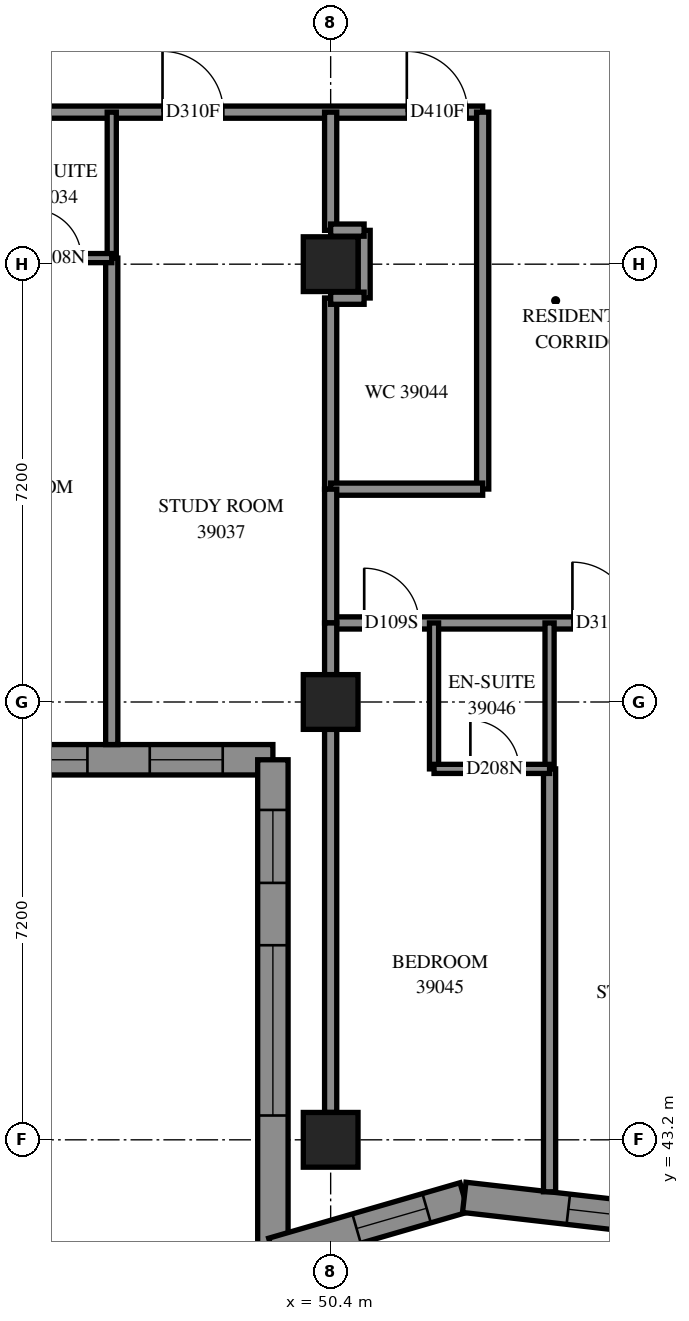
"""IFC4 building model, lengths in metres.
Left out: names, types, materials, properties, quantities, classifications, styles, units other than length and angle.
Written with IfcOpenShell. Run it as: python <this file> out.ifc"""

import sys

from ifc_helpers import new_model, si_unit, direction, frame, frame_2d, origin, origin_2d, place, context, subcontext, project, spatial, polyline, rectangle, outline, extrude, element, fill, save


model = new_model("IFC4")
c1 = context("Model", 3, precision=1e-05, world=origin(), true_north=direction((0.0, 1.0)))
c2 = subcontext(c1, "Body", "Model", "MODEL_VIEW")
j1 = project(units=[si_unit("LENGTHUNIT", "METRE"), si_unit("PLANEANGLEUNIT", "RADIAN")], contexts=[c1])
p1 = place(None, origin())
s1 = spatial("IfcSite", under=j1, at=p1, CompositionType="ELEMENT")
p2 = place(p1, origin())
s2 = spatial("IfcBuilding", under=s1, at=p2, CompositionType="ELEMENT")
p3 = place(p2, frame((0.0, 0.0, 145.6)))
s3 = spatial("IfcBuildingStorey", under=s2, at=p3, CompositionType="ELEMENT", Elevation=145.6)
for number, where, z_axis, x_axis in (
    (1, (50.4, 43.2, 0.0), (0.0, 0.0, 1.0), (1.0, 0.0, 0.0)),
    (2, (50.4, 50.4, 0.0), (0.0, 0.0, 1.0), (1.0, 0.0, 0.0)),
    (3, (50.4, 57.6, 0.0), (0.0, 0.0, 1.0), (1.0, 0.0, 0.0)),
):
    element("IfcColumn", number, at=place(p3, frame(where, z_axis=z_axis, x_axis=x_axis)), inside=s3, PredefinedType="COLUMN", context=c2, shape_type="SweptSolid", body=[
        extrude(rectangle(XDim=0.9, YDim=0.9, at=origin_2d()), origin(), (0.0, 0.0, 1.0), 3.1),
    ])
p4 = place(p3, frame((42.25, 49.45, 0.0), z_axis=(0.0, 0.0, 1.0), x_axis=(1.0, 0.0, 0.0)))
e4 = element("IfcWall", 4, at=p4, inside=s3, PredefinedType="SOLIDWALL", context=c2, shape_type="SweptSolid", body=[
    extrude(outline(polyline([(-0.25, -0.25), (6.95, -0.25), (7.45, 0.25), (0.25, 0.25), (-0.25, -0.25)])), origin(), (0.0, 0.0, 1.0), 3.1),
])
p5 = place(p4, frame((1.35, 0.0, 0.45)))
e5 = element("IfcOpeningElement", 5, at=p5, cuts=e4, PredefinedType="OPENING", context=c2, shape_type="SweptSolid", body=[
    extrude(rectangle(XDim=2.8, YDim=2.5, at=frame_2d((1.4, 1.25))), frame((0.0, 0.26, 0.0), z_axis=(0.0, -1.0, 0.0), x_axis=(1.0, 0.0, 0.0)), (0.0, 0.0, 1.0), 0.52),
])
p6 = place(p4, frame((5.175, 0.0, 0.45)))
e6 = element("IfcOpeningElement", 6, at=p6, cuts=e4, PredefinedType="OPENING", context=c2, shape_type="SweptSolid", body=[
    extrude(rectangle(XDim=1.2, YDim=2.5, at=frame_2d((0.6, 1.25))), frame((0.0, 0.26, 0.0), z_axis=(0.0, -1.0, 0.0), x_axis=(1.0, 0.0, 0.0)), (0.0, 0.0, 1.0), 0.52),
])
p7 = place(p3, frame((49.45, 49.45, 0.0), z_axis=(0.0, 0.0, 1.0), x_axis=(0.0, -1.0, 0.0)))
e7 = element("IfcWall", 7, at=p7, inside=s3, PredefinedType="SOLIDWALL", context=c2, shape_type="SweptSolid", body=[
    extrude(outline(polyline([(0.25, -0.25), (8.441, -0.25), (7.776, 0.25), (-0.25, 0.25), (0.25, -0.25)])), origin(), (0.0, 0.0, 1.0), 3.1),
])
p8 = place(p7, frame((3.05, 0.0, 0.45)))
e8 = element("IfcOpeningElement", 8, at=p8, cuts=e7, PredefinedType="OPENING", context=c2, shape_type="SweptSolid", body=[
    extrude(rectangle(XDim=2.8, YDim=2.5, at=frame_2d((1.4, 1.25))), frame((0.0, 0.26, 0.0), z_axis=(0.0, -1.0, 0.0), x_axis=(1.0, 0.0, 0.0)), (0.0, 0.0, 1.0), 0.52),
])
p9 = place(p7, frame((0.825, 0.0, 0.45)))
e9 = element("IfcOpeningElement", 9, at=p9, cuts=e7, PredefinedType="OPENING", context=c2, shape_type="SweptSolid", body=[
    extrude(rectangle(XDim=1.2, YDim=2.5, at=frame_2d((0.6, 1.25))), frame((0.0, 0.26, 0.0), z_axis=(0.0, -1.0, 0.0), x_axis=(1.0, 0.0, 0.0)), (0.0, 0.0, 1.0), 0.52),
])
p10 = place(p3, frame((49.45, 41.342, 0.0), z_axis=(0.0, 0.0, 1.0), x_axis=(0.9604489769, 0.2784560338, 0.0)))
e10 = element("IfcWall", 10, at=p10, inside=s3, PredefinedType="SOLIDWALL", context=c2, shape_type="SweptSolid", body=[
    extrude(outline(polyline([(-0.333, -0.25), (3.226, -0.25), (3.326, 0.25), (0.333, 0.25), (-0.333, -0.25)])), origin(), (0.0, 0.0, 1.0), 3.1),
])
p11 = place(p10, frame((1.433, 0.0, 0.45)))
e11 = element("IfcOpeningElement", 11, at=p11, cuts=e10, PredefinedType="OPENING", context=c2, shape_type="SweptSolid", body=[
    extrude(rectangle(XDim=1.2, YDim=2.5, at=frame_2d((0.6, 1.25))), frame((0.0, 0.26, 0.0), z_axis=(0.0, -1.0, 0.0), x_axis=(1.0, 0.0, 0.0)), (0.0, 0.0, 1.0), 0.52),
])
p12 = place(p3, frame((52.597, 42.254, 0.0), z_axis=(0.0, 0.0, 1.0), x_axis=(0.9935199118, -0.1136581927, 0.0)))
e12 = element("IfcWall", 12, at=p12, inside=s3, PredefinedType="SOLIDWALL", context=c2, shape_type="SweptSolid", body=[
    extrude(outline(polyline([(0.05, -0.25), (3.491, -0.25), (3.433, 0.25), (-0.05, 0.25), (0.05, -0.25)])), origin(), (0.0, 0.0, 1.0), 3.1),
])
p13 = place(p12, frame((1.723, 0.0, 0.45)))
e13 = element("IfcOpeningElement", 13, at=p13, cuts=e12, PredefinedType="OPENING", context=c2, shape_type="SweptSolid", body=[
    extrude(rectangle(XDim=1.2, YDim=2.5, at=frame_2d((0.6, 1.25))), frame((0.0, 0.26, 0.0), z_axis=(0.0, -1.0, 0.0), x_axis=(1.0, 0.0, 0.0)), (0.0, 0.0, 1.0), 0.52),
])
p14 = place(p3, frame((36.0, 60.1, 0.0), z_axis=(0.0, 0.0, 1.0), x_axis=(1.0, 0.0, 0.0)))
e14 = element("IfcWall", 14, at=p14, inside=s3, PredefinedType="PARTITIONING", context=c2, shape_type="SweptSolid", body=[
    extrude(rectangle(XDim=16.9, YDim=0.2, at=frame_2d((8.45, 0.0))), origin(), (0.0, 0.0, 1.0), 3.1),
])
p15 = place(p14, frame((4.125, 0.0, 0.0)))
e15 = element("IfcOpeningElement", 15, at=p15, cuts=e14, PredefinedType="OPENING", context=c2, shape_type="SweptSolid", body=[
    extrude(rectangle(XDim=1.0, YDim=2.1, at=frame_2d((0.5, 1.05))), frame((0.0, 0.11, 0.0), z_axis=(0.0, -1.0, 0.0), x_axis=(1.0, 0.0, 0.0)), (0.0, 0.0, 1.0), 0.22),
])
p16 = place(p14, frame((7.6, 0.0, 0.0)))
e16 = element("IfcOpeningElement", 16, at=p16, cuts=e14, PredefinedType="OPENING", context=c2, shape_type="SweptSolid", body=[
    extrude(rectangle(XDim=0.9, YDim=2.1, at=frame_2d((0.45, 1.05))), frame((0.0, 0.11, 0.0), z_axis=(0.0, -1.0, 0.0), x_axis=(1.0, 0.0, 0.0)), (0.0, 0.0, 1.0), 0.22),
])
p17 = place(p14, frame((11.635, 0.0, 0.0)))
e17 = element("IfcOpeningElement", 17, at=p17, cuts=e14, PredefinedType="OPENING", context=c2, shape_type="SweptSolid", body=[
    extrude(rectangle(XDim=1.0, YDim=2.1, at=frame_2d((0.5, 1.05))), frame((0.0, 0.11, 0.0), z_axis=(0.0, -1.0, 0.0), x_axis=(1.0, 0.0, 0.0)), (0.0, 0.0, 1.0), 0.22),
])
p18 = place(p14, frame((15.652, 0.0, 0.0)))
e18 = element("IfcOpeningElement", 18, at=p18, cuts=e14, PredefinedType="OPENING", context=c2, shape_type="SweptSolid", body=[
    extrude(rectangle(XDim=1.0, YDim=2.1, at=frame_2d((0.5, 1.05))), frame((0.0, 0.11, 0.0), z_axis=(0.0, -1.0, 0.0), x_axis=(1.0, 0.0, 0.0)), (0.0, 0.0, 1.0), 0.22),
])
p19 = place(p3, frame((46.8, 49.7, 0.0), z_axis=(0.0, 0.0, 1.0), x_axis=(0.0, 1.0, 0.0)))
e19 = element("IfcWall", 19, at=p19, inside=s3, PredefinedType="PARTITIONING", context=c2, shape_type="SweptSolid", body=[
    extrude(rectangle(XDim=8.0, YDim=0.2, at=frame_2d((4.0, 0.0))), origin(), (0.0, 0.0, 1.0), 3.1),
])
p20 = place(p3, frame((54.0, 42.345, 0.0), z_axis=(0.0, 0.0, 1.0), x_axis=(0.0, 1.0, 0.0)))
e20 = element("IfcWall", 20, at=p20, inside=s3, PredefinedType="PARTITIONING", context=c2, shape_type="SweptSolid", body=[
    extrude(rectangle(XDim=6.955, YDim=0.2, at=frame_2d((3.477, 0.0))), origin(), (0.0, 0.0, 1.0), 3.1),
])
p21 = place(p3, frame((50.4, 43.65, 0.0), z_axis=(0.0, 0.0, 1.0), x_axis=(0.0, 1.0, 0.0)))
e21 = element("IfcWall", 21, at=p21, inside=s3, PredefinedType="PARTITIONING", context=c2, shape_type="SweptSolid", body=[
    extrude(rectangle(XDim=6.3, YDim=0.2, at=frame_2d((3.15, 0.0))), origin(), (0.0, 0.0, 1.0), 2.6),
])
p22 = place(p3, frame((52.9, 53.902, 0.0), z_axis=(0.0, 0.0, 1.0), x_axis=(0.0, 1.0, 0.0)))
e22 = element("IfcWall", 22, at=p22, inside=s3, PredefinedType="PARTITIONING", context=c2, shape_type="SweptSolid", body=[
    extrude(rectangle(XDim=6.198, YDim=0.2, at=frame_2d((3.099, 0.0))), origin(), (0.0, 0.0, 1.0), 3.1),
])
p23 = place(p3, frame((50.4, 51.7, 0.0), z_axis=(0.0, 0.0, 1.0), x_axis=(1.0, 0.0, 0.0)))
e23 = element("IfcWall", 23, at=p23, inside=s3, PredefinedType="PARTITIONING", context=c2, shape_type="SweptSolid", body=[
    extrude(rectangle(XDim=5.1, YDim=0.2, at=frame_2d((2.55, 0.0))), origin(), (0.0, 0.0, 1.0), 3.1),
])
p24 = place(p23, frame((0.552, 0.0, 0.0)))
e24 = element("IfcOpeningElement", 24, at=p24, cuts=e23, PredefinedType="OPENING", context=c2, shape_type="SweptSolid", body=[
    extrude(rectangle(XDim=0.9, YDim=2.1, at=frame_2d((0.45, 1.05))), frame((0.0, 0.11, 0.0), z_axis=(0.0, -1.0, 0.0), x_axis=(1.0, 0.0, 0.0)), (0.0, 0.0, 1.0), 0.22),
])
p25 = place(p23, frame((3.976, 0.0, 0.0)))
e25 = element("IfcOpeningElement", 25, at=p25, cuts=e23, PredefinedType="OPENING", context=c2, shape_type="SweptSolid", body=[
    extrude(rectangle(XDim=1.0, YDim=2.1, at=frame_2d((0.5, 1.05))), frame((0.0, 0.11, 0.0), z_axis=(0.0, -1.0, 0.0), x_axis=(1.0, 0.0, 0.0)), (0.0, 0.0, 1.0), 0.22),
])
p26 = place(p3, frame((50.4, 53.9, 0.0), z_axis=(0.0, 0.0, 1.0), x_axis=(0.0, 1.0, 0.0)))
e26 = element("IfcWall", 26, at=p26, inside=s3, PredefinedType="PARTITIONING", context=c2, shape_type="SweptSolid", body=[
    extrude(rectangle(XDim=3.144, YDim=0.2, at=frame_2d((1.572, 0.0))), origin(), (0.0, 0.0, 1.0), 3.1),
])
p27 = place(p3, frame((50.4, 53.9, 0.0), z_axis=(0.0, 0.0, 1.0), x_axis=(1.0, 0.0, 0.0)))
e27 = element("IfcWall", 27, at=p27, inside=s3, PredefinedType="PARTITIONING", context=c2, shape_type="SweptSolid", body=[
    extrude(rectangle(XDim=2.5, YDim=0.2, at=frame_2d((1.25, 0.0))), origin(), (0.0, 0.0, 1.0), 3.1),
])
for number, where, z_axis, x_axis in (
    (28, (52.1, 49.3, 0.0), (0.0, 0.0, 1.0), (0.0, 1.0, 0.0)),
    (29, (54.0, 49.3, 0.0), (0.0, 0.0, 1.0), (0.0, 1.0, 0.0)),
    (30, (46.8, 57.7, 0.0), (0.0, 0.0, 1.0), (0.0, 1.0, 0.0)),
):
    element("IfcWall", number, at=place(p3, frame(where, z_axis=z_axis, x_axis=x_axis)), inside=s3, PredefinedType="PARTITIONING", context=c2, shape_type="SweptSolid", body=[
        extrude(rectangle(XDim=2.4, YDim=0.15, at=frame_2d((1.2, 0.0))), origin(), (0.0, 0.0, 1.0), 3.1),
    ])
p28 = place(p3, frame((50.4, 51.7, 0.0), z_axis=(0.0, 0.0, 1.0), x_axis=(0.0, 1.0, 0.0)))
e31 = element("IfcWall", 31, at=p28, inside=s3, PredefinedType="PARTITIONING", context=c2, shape_type="SweptSolid", body=[
    extrude(rectangle(XDim=2.2, YDim=0.2, at=frame_2d((1.1, 0.0))), origin(), (0.0, 0.0, 1.0), 3.1),
])
p29 = place(p3, frame((50.4, 58.156, 0.0), z_axis=(0.0, 0.0, 1.0), x_axis=(0.0, 1.0, 0.0)))
e32 = element("IfcWall", 32, at=p29, inside=s3, PredefinedType="PARTITIONING", context=c2, shape_type="SweptSolid", body=[
    extrude(rectangle(XDim=1.944, YDim=0.2, at=frame_2d((0.972, 0.0))), origin(), (0.0, 0.0, 1.0), 3.1),
])
p30 = place(p3, frame((44.9, 57.7, 0.0), z_axis=(0.0, 0.0, 1.0), x_axis=(1.0, 0.0, 0.0)))
e33 = element("IfcWall", 33, at=p30, inside=s3, PredefinedType="PARTITIONING", context=c2, shape_type="SweptSolid", body=[
    extrude(rectangle(XDim=1.9, YDim=0.15, at=frame_2d((0.95, 0.0))), origin(), (0.0, 0.0, 1.0), 3.1),
])
p31 = place(p30, frame((0.598, 0.0, 0.0)))
e34 = element("IfcOpeningElement", 34, at=p31, cuts=e33, PredefinedType="OPENING", context=c2, shape_type="SweptSolid", body=[
    extrude(rectangle(XDim=0.8, YDim=2.1, at=frame_2d((0.4, 1.05))), frame((0.0, 0.085, 0.0), z_axis=(0.0, -1.0, 0.0), x_axis=(1.0, 0.0, 0.0)), (0.0, 0.0, 1.0), 0.17),
])
p32 = place(p3, frame((52.1, 49.3, 0.0), z_axis=(0.0, 0.0, 1.0), x_axis=(1.0, 0.0, 0.0)))
e35 = element("IfcWall", 35, at=p32, inside=s3, PredefinedType="PARTITIONING", context=c2, shape_type="SweptSolid", body=[
    extrude(rectangle(XDim=1.9, YDim=0.15, at=frame_2d((0.95, 0.0))), origin(), (0.0, 0.0, 1.0), 3.1),
])
p33 = place(p32, frame((0.598, 0.0, 0.0)))
e36 = element("IfcOpeningElement", 36, at=p33, cuts=e35, PredefinedType="OPENING", context=c2, shape_type="SweptSolid", body=[
    extrude(rectangle(XDim=0.8, YDim=2.1, at=frame_2d((0.4, 1.05))), frame((0.0, 0.085, 0.0), z_axis=(0.0, -1.0, 0.0), x_axis=(1.0, 0.0, 0.0)), (0.0, 0.0, 1.0), 0.17),
])
p34 = place(p3, frame((50.95, 57.044, 0.0), z_axis=(0.0, 0.0, 1.0), x_axis=(0.0, 1.0, 0.0)))
e37 = element("IfcWall", 37, at=p34, inside=s3, PredefinedType="PARTITIONING", context=c2, shape_type="SweptSolid", body=[
    extrude(rectangle(XDim=1.112, YDim=0.2, at=frame_2d((0.556, 0.0))), origin(), (0.0, 0.0, 1.0), 3.1),
])
p35 = place(p3, frame((50.4, 50.85, 0.0), z_axis=(0.0, 0.0, 1.0), x_axis=(0.0, 1.0, 0.0)))
e38 = element("IfcWall", 38, at=p35, inside=s3, PredefinedType="PARTITIONING", context=c2, shape_type="SweptSolid", body=[
    extrude(rectangle(XDim=0.85, YDim=0.2, at=frame_2d((0.425, 0.0))), origin(), (0.0, 0.0, 1.0), 3.1),
])
for number, where, z_axis, x_axis in (
    (39, (50.4, 58.16, 0.0), (0.0, 0.0, 1.0), (1.0, 0.0, 0.0)),
    (40, (50.4, 57.04, 0.0), (0.0, 0.0, 1.0), (1.0, 0.0, 0.0)),
):
    element("IfcWall", number, at=place(p3, frame(where, z_axis=z_axis, x_axis=x_axis)), inside=s3, PredefinedType="PARTITIONING", context=c2, shape_type="SweptSolid", body=[
        extrude(rectangle(XDim=0.55, YDim=0.2, at=frame_2d((0.275, 0.0))), origin(), (0.0, 0.0, 1.0), 3.1),
    ])
p36 = place(p5, origin())
e41 = element("IfcWindow", 41, at=p36, inside=s3, PartitioningType="SINGLE_PANEL", PredefinedType="WINDOW", context=c2, shape_type="SweptSolid", body=[
    extrude(rectangle(XDim=2.8, YDim=2.5, at=frame_2d((1.4, 1.25))), frame((0.0, 0.18, 0.0), z_axis=(0.0, -1.0, 0.0), x_axis=(1.0, 0.0, 0.0)), (0.0, 0.0, 1.0), 0.06),
])
fill(e5, e41)
p37 = place(p6, origin())
e42 = element("IfcWindow", 42, at=p37, inside=s3, PartitioningType="SINGLE_PANEL", PredefinedType="WINDOW", context=c2, shape_type="SweptSolid", body=[
    extrude(rectangle(XDim=1.2, YDim=2.5, at=frame_2d((0.6, 1.25))), frame((0.0, 0.18, 0.0), z_axis=(0.0, -1.0, 0.0), x_axis=(1.0, 0.0, 0.0)), (0.0, 0.0, 1.0), 0.06),
])
fill(e6, e42)
p38 = place(p8, origin())
e43 = element("IfcWindow", 43, at=p38, inside=s3, PartitioningType="SINGLE_PANEL", PredefinedType="WINDOW", context=c2, shape_type="SweptSolid", body=[
    extrude(rectangle(XDim=2.8, YDim=2.5, at=frame_2d((1.4, 1.25))), frame((0.0, 0.18, 0.0), z_axis=(0.0, -1.0, 0.0), x_axis=(1.0, 0.0, 0.0)), (0.0, 0.0, 1.0), 0.06),
])
fill(e8, e43)
p39 = place(p9, origin())
e44 = element("IfcWindow", 44, at=p39, inside=s3, PartitioningType="SINGLE_PANEL", PredefinedType="WINDOW", context=c2, shape_type="SweptSolid", body=[
    extrude(rectangle(XDim=1.2, YDim=2.5, at=frame_2d((0.6, 1.25))), frame((0.0, 0.18, 0.0), z_axis=(0.0, -1.0, 0.0), x_axis=(1.0, 0.0, 0.0)), (0.0, 0.0, 1.0), 0.06),
])
fill(e9, e44)
p40 = place(p11, origin())
e45 = element("IfcWindow", 45, at=p40, inside=s3, PartitioningType="SINGLE_PANEL", PredefinedType="WINDOW", context=c2, shape_type="SweptSolid", body=[
    extrude(rectangle(XDim=1.2, YDim=2.5, at=frame_2d((0.6, 1.25))), frame((0.0, 0.18, 0.0), z_axis=(0.0, -1.0, 0.0), x_axis=(1.0, 0.0, 0.0)), (0.0, 0.0, 1.0), 0.06),
])
fill(e11, e45)
p41 = place(p13, origin())
e46 = element("IfcWindow", 46, at=p41, inside=s3, PartitioningType="SINGLE_PANEL", PredefinedType="WINDOW", context=c2, shape_type="SweptSolid", body=[
    extrude(rectangle(XDim=1.2, YDim=2.5, at=frame_2d((0.6, 1.25))), frame((0.0, 0.18, 0.0), z_axis=(0.0, -1.0, 0.0), x_axis=(1.0, 0.0, 0.0)), (0.0, 0.0, 1.0), 0.06),
])
fill(e13, e46)
p42 = place(p31, origin())
e47 = element("IfcDoor", 47, at=p42, inside=s3, OperationType="SINGLE_SWING_RIGHT", PredefinedType="DOOR", context=c2, shape_type="SweptSolid", body=[
    extrude(rectangle(XDim=0.8, YDim=2.1, at=frame_2d((0.4, 1.05))), frame((0.0, 0.025, 0.0), z_axis=(0.0, -1.0, 0.0), x_axis=(1.0, 0.0, 0.0)), (0.0, 0.0, 1.0), 0.05),
])
fill(e34, e47)
p43 = place(p17, origin())
e48 = element("IfcDoor", 48, at=p43, inside=s3, OperationType="SINGLE_SWING_RIGHT", PredefinedType="DOOR", context=c2, shape_type="SweptSolid", body=[
    extrude(rectangle(XDim=1.0, YDim=2.1, at=frame_2d((0.5, 1.05))), frame((0.0, 0.025, 0.0), z_axis=(0.0, -1.0, 0.0), x_axis=(1.0, 0.0, 0.0)), (0.0, 0.0, 1.0), 0.05),
])
fill(e17, e48)
p44 = place(p18, origin())
e49 = element("IfcDoor", 49, at=p44, inside=s3, OperationType="SINGLE_SWING_LEFT", PredefinedType="DOOR", context=c2, shape_type="SweptSolid", body=[
    extrude(rectangle(XDim=1.0, YDim=2.1, at=frame_2d((0.5, 1.05))), frame((0.0, 0.025, 0.0), z_axis=(0.0, -1.0, 0.0), x_axis=(1.0, 0.0, 0.0)), (0.0, 0.0, 1.0), 0.05),
])
fill(e18, e49)
p45 = place(p24, origin())
e50 = element("IfcDoor", 50, at=p45, inside=s3, OperationType="SINGLE_SWING_LEFT", PredefinedType="DOOR", context=c2, shape_type="SweptSolid", body=[
    extrude(rectangle(XDim=0.9, YDim=2.1, at=frame_2d((0.45, 1.05))), frame((0.0, 0.025, 0.0), z_axis=(0.0, -1.0, 0.0), x_axis=(1.0, 0.0, 0.0)), (0.0, 0.0, 1.0), 0.05),
])
fill(e24, e50)
p46 = place(p33, origin())
e51 = element("IfcDoor", 51, at=p46, inside=s3, OperationType="SINGLE_SWING_RIGHT", PredefinedType="DOOR", context=c2, shape_type="SweptSolid", body=[
    extrude(rectangle(XDim=0.8, YDim=2.1, at=frame_2d((0.4, 1.05))), frame((0.0, 0.025, 0.0), z_axis=(0.0, -1.0, 0.0), x_axis=(1.0, 0.0, 0.0)), (0.0, 0.0, 1.0), 0.05),
])
fill(e36, e51)
p47 = place(p25, origin())
e52 = element("IfcDoor", 52, at=p47, inside=s3, OperationType="SINGLE_SWING_RIGHT", PredefinedType="DOOR", context=c2, shape_type="SweptSolid", body=[
    extrude(rectangle(XDim=1.0, YDim=2.1, at=frame_2d((0.5, 1.05))), frame((0.0, 0.025, 0.0), z_axis=(0.0, -1.0, 0.0), x_axis=(1.0, 0.0, 0.0)), (0.0, 0.0, 1.0), 0.05),
])
fill(e25, e52)
save(model, sys.argv[1])
